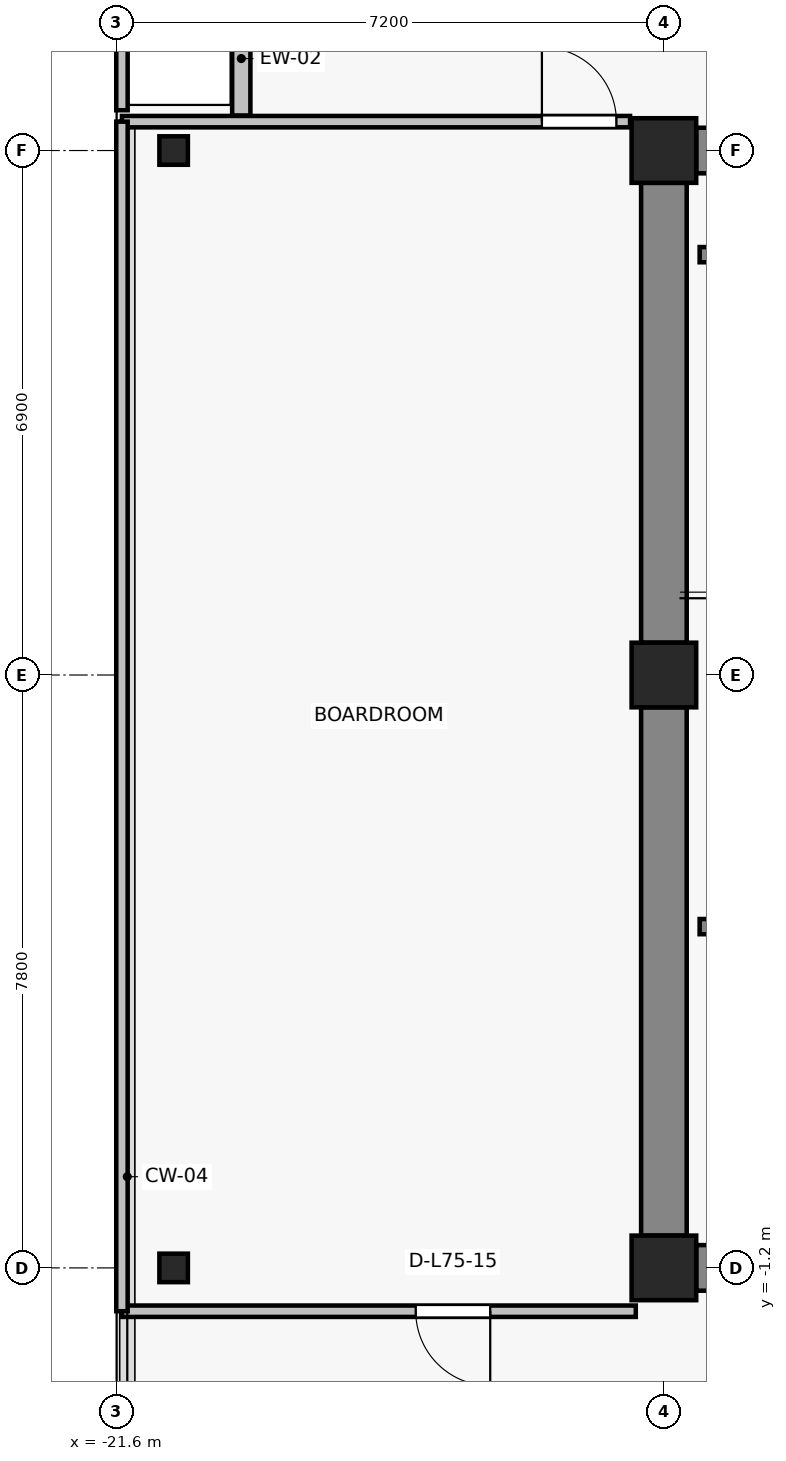
"""IFC4 building model, lengths in metres.
Left out: names, types, materials, properties, quantities, classifications, styles, units other than length and angle.
Written with IfcOpenShell. Run it as: python <this file> out.ifc"""

import sys

from ifc_helpers import new_model, si_unit, direction, frame, frame_2d, origin, origin_2d, place, context, subcontext, project, spatial, rectangle, i_section, extrude, source, transform, mapped, element, fill, save


model = new_model("IFC4")
c1 = context("Model", 3, precision=1e-05, world=origin(), true_north=direction((0.0, 1.0)))
c2 = subcontext(c1, "Body", "Model", "MODEL_VIEW")
j1 = project(units=[si_unit("LENGTHUNIT", "METRE"), si_unit("PLANEANGLEUNIT", "RADIAN")], contexts=[c1])
p1 = place(None, origin())
s1 = spatial("IfcSite", under=j1, at=p1, CompositionType="ELEMENT")
p2 = place(p1, origin())
s2 = spatial("IfcBuilding", under=s1, at=p2, CompositionType="ELEMENT")
p3 = place(p2, frame((0.0, 0.0, 265.0)))
s3 = spatial("IfcBuildingStorey", under=s2, at=p3, CompositionType="ELEMENT", Elevation=265.0)
for number, where, z_axis, x_axis in (
    (1, (-14.4, -1.2, 0.0), (0.0, 0.0, 1.0), (1.0, 0.0, 0.0)),
    (2, (-14.4, 6.6, 0.0), (0.0, 0.0, 1.0), (1.0, 0.0, 0.0)),
    (3, (-14.4, 13.5, 0.0), (0.0, 0.0, 1.0), (1.0, 0.0, 0.0)),
):
    element("IfcColumn", number, at=place(p3, frame(where, z_axis=z_axis, x_axis=x_axis)), inside=s3, PredefinedType="COLUMN", context=c2, shape_type="SweptSolid", body=[
        extrude(rectangle(XDim=0.85, YDim=0.85, at=origin_2d()), origin(), (0.0, 0.0, 1.0), 3.3),
    ])
for number, where, z_axis, x_axis in (
    (4, (-20.85, -1.2, 0.0), (0.0, 0.0, 1.0), (1.0, 0.0, 0.0)),
    (5, (-20.85, 13.5, 0.0), (0.0, 0.0, 1.0), (1.0, 0.0, 0.0)),
):
    element("IfcColumn", number, at=place(p3, frame(where, z_axis=z_axis, x_axis=x_axis)), inside=s3, PredefinedType="COLUMN", context=c2, shape_type="SweptSolid", body=[
        extrude(i_section(OverallWidth=0.375, OverallDepth=0.375, WebThickness=0.017, FlangeThickness=0.027, FilletRadius=0.015, at=origin_2d()), origin(), (0.0, 0.0, 1.0), 3.3),
    ])
p4 = place(p3, frame((-13.975, 13.5, 0.0), z_axis=(0.0, 0.0, 1.0), x_axis=(1.0, 0.0, 0.0)))
e6 = element("IfcWall", 6, at=p4, inside=s3, PredefinedType="SHEAR", context=c2, shape_type="SweptSolid", body=[
    extrude(rectangle(XDim=6.35, YDim=0.6, at=frame_2d((3.175, 0.0))), origin(), (0.0, 0.0, 1.0), 3.075),
])
p5 = place(p3, frame((-14.4, -0.775, 0.0), z_axis=(0.0, 0.0, 1.0), x_axis=(0.0, 1.0, 0.0)))
e7 = element("IfcWall", 7, at=p5, inside=s3, PredefinedType="SHEAR", context=c2, shape_type="SweptSolid", body=[
    extrude(rectangle(XDim=6.95, YDim=0.6, at=frame_2d((3.475, 0.0))), origin(), (0.0, 0.0, 1.0), 3.075),
])
p6 = place(p3, frame((-14.4, 7.025, 0.0), z_axis=(0.0, 0.0, 1.0), x_axis=(0.0, 1.0, 0.0)))
e8 = element("IfcWall", 8, at=p6, inside=s3, PredefinedType="SHEAR", context=c2, shape_type="SweptSolid", body=[
    extrude(rectangle(XDim=6.05, YDim=0.6, at=frame_2d((3.025, 0.0))), origin(), (0.0, 0.0, 1.0), 3.075),
])
p7 = place(p3, frame((-7.625, -1.2, 0.0), z_axis=(0.0, 0.0, 1.0), x_axis=(-1.0, 0.0, 0.0)))
e9 = element("IfcWall", 9, at=p7, inside=s3, PredefinedType="SHEAR", context=c2, shape_type="SweptSolid", body=[
    extrude(rectangle(XDim=6.35, YDim=0.6, at=frame_2d((3.175, 0.0))), origin(), (0.0, 0.0, 1.0), 3.075),
])
p8 = place(p7, frame((2.7, 0.0, 0.0)))
e10 = element("IfcOpeningElement", 10, at=p8, cuts=e9, PredefinedType="OPENING", context=c2, shape_type="SweptSolid", body=[
    extrude(rectangle(XDim=1.15, YDim=2.15, at=frame_2d((0.575, 1.075))), frame((0.0, 0.31, 0.0), z_axis=(0.0, -1.0, 0.0), x_axis=(1.0, 0.0, 0.0)), (0.0, 0.0, 1.0), 0.62),
])
p9 = place(p3, frame((-19.96, 15.46, 0.0), z_axis=(0.0, 0.0, 1.0), x_axis=(0.0, -1.0, 0.0)))
e11 = element("IfcWall", 11, at=p9, inside=s3, PredefinedType="SOLIDWALL", context=c2, shape_type="SweptSolid", body=[
    extrude(rectangle(XDim=1.5, YDim=0.24, at=frame_2d((0.75, 0.0))), origin(), (0.0, 0.0, 1.0), 3.075),
])
p10 = place(p3, frame((-10.41, 3.29, 0.0), z_axis=(0.0, 0.0, 1.0), x_axis=(-1.0, 0.0, 0.0)))
e12 = element("IfcWall", 12, at=p10, inside=s3, PredefinedType="SOLIDWALL", context=c2, shape_type="SweptSolid", body=[
    extrude(rectangle(XDim=3.52, YDim=0.2, at=frame_2d((1.76, 0.0))), origin(), (0.0, 0.0, 1.0), 3.075),
])
p11 = place(p10, frame((1.165, 0.0, 0.0)))
e13 = element("IfcOpeningElement", 13, at=p11, cuts=e12, PredefinedType="OPENING", context=c2, shape_type="SweptSolid", body=[
    extrude(rectangle(XDim=1.15, YDim=2.15, at=frame_2d((0.575, 1.075))), frame((0.0, 0.11, 0.0), z_axis=(0.0, -1.0, 0.0), x_axis=(1.0, 0.0, 0.0)), (0.0, 0.0, 1.0), 0.22),
])
p12 = place(p3, frame((-13.93, 12.13, 0.0), z_axis=(0.0, 0.0, 1.0), x_axis=(1.0, 0.0, 0.0)))
e14 = element("IfcWall", 14, at=p12, inside=s3, PredefinedType="SOLIDWALL", context=c2, shape_type="SweptSolid", body=[
    extrude(rectangle(XDim=3.52, YDim=0.2, at=frame_2d((1.76, 0.0))), origin(), (0.0, 0.0, 1.0), 3.075),
])
p13 = place(p3, frame((-14.77, -1.77, 0.0), z_axis=(0.0, 0.0, 1.0), x_axis=(-1.0, 0.0, 0.0)))
e15 = element("IfcWall", 15, at=p13, inside=s3, PredefinedType="PARTITIONING", context=c2, shape_type="SweptSolid", body=[
    extrude(rectangle(XDim=6.76, YDim=0.15, at=frame_2d((3.38, 0.0))), origin(), (0.0, 0.0, 1.0), 2.765),
])
p14 = place(p13, frame((1.915, 0.0, 0.0)))
e16 = element("IfcOpeningElement", 16, at=p14, cuts=e15, PredefinedType="OPENING", context=c2, shape_type="SweptSolid", body=[
    extrude(rectangle(XDim=0.98, YDim=2.15, at=frame_2d((0.49, 1.075))), frame((0.0, 0.085, 0.0), z_axis=(0.0, -1.0, 0.0), x_axis=(1.0, 0.0, 0.0)), (0.0, 0.0, 1.0), 0.17),
])
p15 = place(p3, frame((-21.53, 13.88, 0.0), z_axis=(0.0, 0.0, 1.0), x_axis=(1.0, 0.0, 0.0)))
e17 = element("IfcWall", 17, at=p15, inside=s3, PredefinedType="PARTITIONING", context=c2, shape_type="SweptSolid", body=[
    extrude(rectangle(XDim=6.685, YDim=0.15, at=frame_2d((3.343, 0.0))), origin(), (0.0, 0.0, 1.0), 3.075),
])
p16 = place(p15, frame((5.525, 0.0, 0.0)))
e18 = element("IfcOpeningElement", 18, at=p16, cuts=e17, PredefinedType="OPENING", context=c2, shape_type="SweptSolid", body=[
    extrude(rectangle(XDim=0.98, YDim=2.15, at=frame_2d((0.49, 1.075))), frame((0.0, 0.085, 0.0), z_axis=(0.0, -1.0, 0.0), x_axis=(1.0, 0.0, 0.0)), (0.0, 0.0, 1.0), 0.17),
])
p17 = place(p3, frame((-21.53, -1.77, 0.0), z_axis=(0.0, 0.0, 1.0), x_axis=(0.0, 1.0, 0.0)))
e19 = element("IfcWall", 19, at=p17, inside=s3, PredefinedType="PARTITIONING", context=c2, shape_type="SweptSolid", body=[
    extrude(rectangle(XDim=15.65, YDim=0.15, at=frame_2d((7.825, 0.0))), origin(), (0.0, 0.0, 1.0), 3.075),
])
p18 = place(p3, frame((-21.53, 14.03, 0.0), z_axis=(0.0, 0.0, 1.0), x_axis=(0.0, 1.0, 0.0)))
e20 = element("IfcWall", 20, at=p18, inside=s3, PredefinedType="PARTITIONING", context=c2, shape_type="SweptSolid", body=[
    extrude(rectangle(XDim=3.0, YDim=0.15, at=frame_2d((1.5, 0.0))), origin(), (0.0, 0.0, 1.0), 3.075),
])
m1 = source(origin(), c2, "Body", "SweptSolid", [
    extrude(rectangle(XDim=0.98, YDim=2.15, at=frame_2d((0.49, 1.075))), frame((0.0, 0.025, 0.0), z_axis=(0.0, -1.0, 0.0), x_axis=(1.0, 0.0, 0.0)), (0.0, 0.0, 1.0), 0.05),
])
p19 = place(p14, origin())
e21 = element("IfcDoor", 21, at=p19, inside=s3, OperationType="SINGLE_SWING_LEFT", PredefinedType="DOOR", context=c2, shape_type="MappedRepresentation", body=[
    mapped(m1, transform((0.0, 0.0, 0.0), x_axis=(1.0, 0.0, 0.0), y_axis=(0.0, 1.0, 0.0), z_axis=(0.0, 0.0, 1.0), scale=1.0)),
])
fill(e16, e21)
p20 = place(p16, origin())
e22 = element("IfcDoor", 22, at=p20, inside=s3, OperationType="SINGLE_SWING_LEFT", PredefinedType="DOOR", context=c2, shape_type="MappedRepresentation", body=[
    mapped(m1, transform((0.0, 0.0, 0.0), x_axis=(1.0, 0.0, 0.0), y_axis=(0.0, 1.0, 0.0), z_axis=(0.0, 0.0, 1.0), scale=1.0)),
])
fill(e18, e22)
save(model, sys.argv[1])
